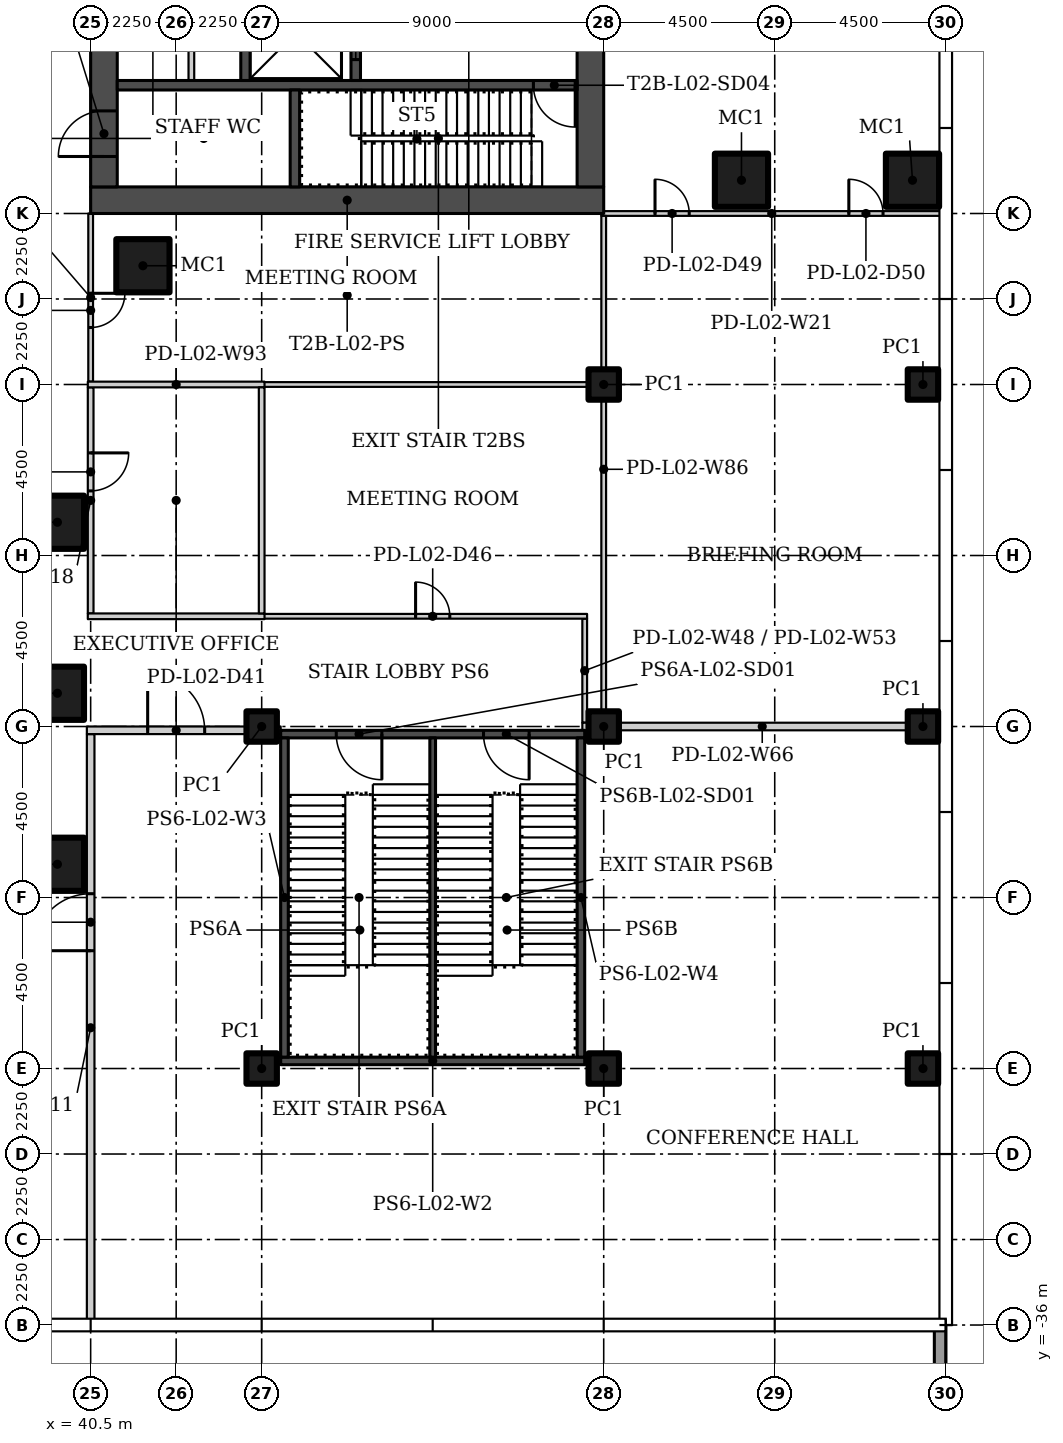
"""IFC4 building model, lengths in metres.
Left out: names, types, materials, properties, quantities, classifications, styles, units other than length and angle.
Written with IfcOpenShell. Run it as: python <this file> out.ifc"""

import sys

from ifc_helpers import new_model, si_unit, direction, frame, frame_2d, origin, origin_2d, place, context, subcontext, project, spatial, rectangle, hollow_rectangle, extrude, element, fill, save


model = new_model("IFC4")
c1 = context("Model", 3, precision=1e-05, world=origin(), true_north=direction((0.0, 1.0)))
c2 = subcontext(c1, "Body", "Model", "MODEL_VIEW")
j1 = project(units=[si_unit("LENGTHUNIT", "METRE"), si_unit("PLANEANGLEUNIT", "RADIAN")], contexts=[c1])
p1 = place(None, origin())
s1 = spatial("IfcSite", under=j1, at=p1, CompositionType="ELEMENT")
p2 = place(p1, origin())
s2 = spatial("IfcBuilding", under=s1, at=p2, CompositionType="ELEMENT")
p3 = place(p2, frame((0.0, 0.0, 12.5)))
s3 = spatial("IfcBuildingStorey", under=s2, at=p3, CompositionType="ELEMENT", Elevation=12.5)
for number, where in (
    (1, (41.875, -8.125, 0.0)),
    (2, (39.625, -14.875, 0.0)),
    (3, (39.625, -19.375, 0.0)),
    (4, (39.625, -23.875, 0.0)),
    (5, (57.625, -5.875, 0.0)),
    (6, (62.125, -5.875, 0.0)),
):
    element("IfcColumn", number, at=place(p3, frame(where)), inside=s3, PredefinedType="COLUMN", context=c2, shape_type="SweptSolid", body=[
        extrude(hollow_rectangle(XDim=1.4, YDim=1.4, WallThickness=0.06, at=origin_2d()), origin(), (0.0, 0.0, 1.0), 5.6),
    ])
for number, where in (
    (7, (45.0, -29.25, 0.0)),
    (8, (45.0, -20.25, 0.0)),
    (9, (54.0, -29.25, 0.0)),
    (10, (54.0, -20.25, 0.0)),
    (11, (54.0, -11.25, 0.0)),
    (12, (62.4, -29.25, 0.0)),
    (13, (62.4, -20.25, 0.0)),
    (14, (62.4, -11.25, 0.0)),
):
    element("IfcColumn", number, at=place(p3, frame(where)), inside=s3, PredefinedType="COLUMN", context=c2, shape_type="SweptSolid", body=[
        extrude(hollow_rectangle(XDim=0.8, YDim=0.8, WallThickness=0.03, at=origin_2d()), origin(), (0.0, 0.0, 1.0), 5.6),
    ])
p4 = place(p3, frame((40.5, -35.905, 0.0), z_axis=(0.0, 0.0, 1.0), x_axis=(0.0, 1.0, 0.0)))
e15 = element("IfcWall", 15, at=p4, inside=s3, PredefinedType="PARTITIONING", context=c2, shape_type="SweptSolid", body=[
    extrude(rectangle(XDim=15.455, YDim=0.2, at=frame_2d((7.728, 0.0))), origin(), (0.0, 0.0, 1.0), 5.6),
])
p5 = place(p4, frame((9.755, 0.0, 0.0)))
e16 = element("IfcOpeningElement", 16, at=p5, cuts=e15, PredefinedType="OPENING", context=c2, shape_type="SweptSolid", body=[
    extrude(rectangle(XDim=1.5, YDim=2.1, at=frame_2d((0.75, 1.05))), frame((0.0, 0.11, 0.0), z_axis=(0.0, -1.0, 0.0), x_axis=(1.0, 0.0, 0.0)), (0.0, 0.0, 1.0), 0.22),
])
p6 = place(p3, frame((40.5, -6.75, 0.0), z_axis=(0.0, 0.0, 1.0), x_axis=(0.0, -1.0, 0.0)))
e17 = element("IfcWall", 17, at=p6, inside=s3, PredefinedType="PARTITIONING", context=c2, shape_type="SweptSolid", body=[
    extrude(rectangle(XDim=4.425, YDim=0.125, at=frame_2d((2.212, 0.0))), origin(), (0.0, 0.0, 1.0), 5.6),
])
p7 = place(p6, frame((2.1, 0.0, 0.0)))
e18 = element("IfcOpeningElement", 18, at=p7, cuts=e17, PredefinedType="OPENING", context=c2, shape_type="SweptSolid", body=[
    extrude(rectangle(XDim=0.9, YDim=2.1, at=frame_2d((0.45, 1.05))), frame((0.0, 0.073, 0.0), z_axis=(0.0, -1.0, 0.0), x_axis=(1.0, 0.0, 0.0)), (0.0, 0.0, 1.0), 0.145),
])
p8 = place(p3, frame((40.5, -11.325, 0.0), z_axis=(0.0, 0.0, 1.0), x_axis=(0.0, -1.0, 0.0)))
e19 = element("IfcWall", 19, at=p8, inside=s3, PredefinedType="PARTITIONING", context=c2, shape_type="SweptSolid", body=[
    extrude(rectangle(XDim=5.95, YDim=0.15, at=frame_2d((2.975, 0.0))), origin(), (0.0, 0.0, 1.0), 5.6),
])
p9 = place(p8, frame((1.725, 0.0, 0.0)))
e20 = element("IfcOpeningElement", 20, at=p9, cuts=e19, PredefinedType="OPENING", context=c2, shape_type="SweptSolid", body=[
    extrude(rectangle(XDim=1.0, YDim=2.4, at=frame_2d((0.5, 1.2))), frame((0.0, 0.085, 0.0), z_axis=(0.0, -1.0, 0.0), x_axis=(1.0, 0.0, 0.0)), (0.0, 0.0, 1.0), 0.17),
])
p10 = place(p3, frame((53.938, -6.75, 0.0)))
e21 = element("IfcWall", 21, at=p10, inside=s3, PredefinedType="PARTITIONING", context=c2, shape_type="SweptSolid", body=[
    extrude(rectangle(XDim=8.968, YDim=0.125, at=frame_2d((4.484, 0.0))), origin(), (0.0, 0.0, 1.0), 5.6),
])
p11 = place(p10, frame((1.413, 0.0, 0.0)))
e22 = element("IfcOpeningElement", 22, at=p11, cuts=e21, PredefinedType="OPENING", context=c2, shape_type="SweptSolid", body=[
    extrude(rectangle(XDim=0.9, YDim=2.1, at=frame_2d((0.45, 1.05))), frame((0.0, 0.073, 0.0), z_axis=(0.0, -1.0, 0.0), x_axis=(1.0, 0.0, 0.0)), (0.0, 0.0, 1.0), 0.145),
])
p12 = place(p10, frame((6.512, 0.0, 0.0)))
e23 = element("IfcOpeningElement", 23, at=p12, cuts=e21, PredefinedType="OPENING", context=c2, shape_type="SweptSolid", body=[
    extrude(rectangle(XDim=0.9, YDim=2.1, at=frame_2d((0.45, 1.05))), frame((0.0, 0.073, 0.0), z_axis=(0.0, -1.0, 0.0), x_axis=(1.0, 0.0, 0.0)), (0.0, 0.0, 1.0), 0.145),
])
p13 = place(p3, frame((53.5, -17.412, 0.0), z_axis=(0.0, 0.0, 1.0), x_axis=(0.0, -1.0, 0.0)))
e24 = element("IfcWall", 24, at=p13, inside=s3, PredefinedType="PARTITIONING", context=c2, shape_type="SweptSolid", body=[
    extrude(rectangle(XDim=2.738, YDim=0.125, at=frame_2d((1.369, 0.0))), origin(), (0.0, 0.0, 1.0), 5.6),
])
p14 = place(p3, frame((44.925, -17.35, 0.0)))
e25 = element("IfcWall", 25, at=p14, inside=s3, PredefinedType="PARTITIONING", context=c2, shape_type="SweptSolid", body=[
    extrude(rectangle(XDim=8.637, YDim=0.125, at=frame_2d((4.319, 0.0))), origin(), (0.0, 0.0, 1.0), 5.6),
])
p15 = place(p14, frame((4.125, 0.0, 0.0)))
e26 = element("IfcOpeningElement", 26, at=p15, cuts=e25, PredefinedType="OPENING", context=c2, shape_type="SweptSolid", body=[
    extrude(rectangle(XDim=0.9, YDim=2.1, at=frame_2d((0.45, 1.05))), frame((0.0, 0.073, 0.0), z_axis=(0.0, -1.0, 0.0), x_axis=(1.0, 0.0, 0.0)), (0.0, 0.0, 1.0), 0.145),
])
p16 = place(p3, frame((40.4, -20.35, 0.0)))
e27 = element("IfcWall", 27, at=p16, inside=s3, PredefinedType="PARTITIONING", context=c2, shape_type="SweptSolid", body=[
    extrude(rectangle(XDim=5.1, YDim=0.2, at=frame_2d((2.55, 0.0))), origin(), (0.0, 0.0, 1.0), 5.6),
])
p17 = place(p16, frame((1.6, 0.0, 0.0)))
e28 = element("IfcOpeningElement", 28, at=p17, cuts=e27, PredefinedType="OPENING", context=c2, shape_type="SweptSolid", body=[
    extrude(rectangle(XDim=1.5, YDim=2.1, at=frame_2d((0.75, 1.05))), frame((0.0, 0.11, 0.0), z_axis=(0.0, -1.0, 0.0), x_axis=(1.0, 0.0, 0.0)), (0.0, 0.0, 1.0), 0.22),
])
p18 = place(p3, frame((40.425, -17.35, 0.0)))
e29 = element("IfcWall", 29, at=p18, inside=s3, PredefinedType="PARTITIONING", context=c2, shape_type="SweptSolid", body=[
    extrude(rectangle(XDim=4.65, YDim=0.15, at=frame_2d((2.325, 0.0))), origin(), (0.0, 0.0, 1.0), 5.6),
])
p19 = place(p3, frame((62.905, -20.25, 0.0), z_axis=(0.0, 0.0, 1.0), x_axis=(-1.0, 0.0, 0.0)))
e30 = element("IfcWall", 30, at=p19, inside=s3, PredefinedType="PARTITIONING", context=c2, shape_type="SweptSolid", body=[
    extrude(rectangle(XDim=9.468, YDim=0.2, at=frame_2d((4.734, 0.0))), origin(), (0.0, 0.0, 1.0), 5.6),
])
p20 = place(p3, frame((54.0, -6.812, 0.0), z_axis=(0.0, 0.0, 1.0), x_axis=(0.0, -1.0, 0.0)))
e31 = element("IfcWall", 31, at=p20, inside=s3, PredefinedType="PARTITIONING", context=c2, shape_type="SweptSolid", body=[
    extrude(rectangle(XDim=13.337, YDim=0.125, at=frame_2d((6.669, 0.0))), origin(), (0.0, 0.0, 1.0), 5.6),
])
p21 = place(p3, frame((44.925, -11.25, 0.0)))
e32 = element("IfcWall", 32, at=p21, inside=s3, PredefinedType="PARTITIONING", context=c2, shape_type="SweptSolid", body=[
    extrude(rectangle(XDim=9.012, YDim=0.125, at=frame_2d((4.506, 0.0))), origin(), (0.0, 0.0, 1.0), 5.6),
])
p22 = place(p3, frame((40.425, -11.25, 0.0)))
e33 = element("IfcWall", 33, at=p22, inside=s3, PredefinedType="PARTITIONING", context=c2, shape_type="SweptSolid", body=[
    extrude(rectangle(XDim=4.65, YDim=0.15, at=frame_2d((2.325, 0.0))), origin(), (0.0, 0.0, 1.0), 5.6),
])
p23 = place(p3, frame((45.0, -11.325, 0.0), z_axis=(0.0, 0.0, 1.0), x_axis=(0.0, -1.0, 0.0)))
e34 = element("IfcWall", 34, at=p23, inside=s3, PredefinedType="PARTITIONING", context=c2, shape_type="SweptSolid", body=[
    extrude(rectangle(XDim=5.95, YDim=0.15, at=frame_2d((2.975, 0.0))), origin(), (0.0, 0.0, 1.0), 5.6),
])
p24 = place(p3, frame((62.85, -37.95, 0.0), z_axis=(0.0, 0.0, 1.0), x_axis=(0.0, 1.0, 0.0)))
e35 = element("IfcWall", 35, at=p24, inside=s3, PredefinedType="PARAPET", context=c2, shape_type="SweptSolid", body=[
    extrude(rectangle(XDim=1.95, YDim=0.3, at=frame_2d((0.975, 0.0))), origin(), (0.0, 0.0, 1.0), 1.1),
])
p25 = place(p3, frame((54.0, -6.4, 0.0), z_axis=(0.0, 0.0, 1.0), x_axis=(-1.0, 0.0, 0.0)))
e36 = element("IfcWall", 36, at=p25, inside=s3, PredefinedType="SHEAR", context=c2, shape_type="SweptSolid", body=[
    extrude(rectangle(XDim=13.5, YDim=0.7, at=frame_2d((6.75, 0.0))), origin(), (0.0, 0.0, 1.0), 5.6),
])
p26 = place(p3, frame((53.65, -6.05, 0.0), z_axis=(0.0, 0.0, 1.0), x_axis=(0.0, 1.0, 0.0)))
e37 = element("IfcWall", 37, at=p26, inside=s3, PredefinedType="SHEAR", context=c2, shape_type="SweptSolid", body=[
    extrude(rectangle(XDim=12.1, YDim=0.7, at=frame_2d((6.05, 0.0))), origin(), (0.0, 0.0, 1.0), 5.6),
])
p27 = place(p26, frame((6.4, 0.0, 0.0)))
e38 = element("IfcOpeningElement", 38, at=p27, cuts=e37, PredefinedType="OPENING", context=c2, shape_type="SweptSolid", body=[
    extrude(rectangle(XDim=1.8, YDim=2.4, at=frame_2d((0.9, 1.2))), frame((0.0, 0.36, 0.0), z_axis=(0.0, -1.0, 0.0), x_axis=(1.0, 0.0, 0.0)), (0.0, 0.0, 1.0), 0.72),
])
p28 = place(p3, frame((40.85, -6.05, 0.0), z_axis=(0.0, 0.0, 1.0), x_axis=(0.0, 1.0, 0.0)))
e39 = element("IfcWall", 39, at=p28, inside=s3, PredefinedType="SHEAR", context=c2, shape_type="SweptSolid", body=[
    extrude(rectangle(XDim=12.1, YDim=0.7, at=frame_2d((6.05, 0.0))), origin(), (0.0, 0.0, 1.0), 5.6),
])
p29 = place(p28, frame((0.8, 0.0, 0.0)))
e40 = element("IfcOpeningElement", 40, at=p29, cuts=e39, PredefinedType="OPENING", context=c2, shape_type="SweptSolid", body=[
    extrude(rectangle(XDim=1.2, YDim=2.1, at=frame_2d((0.6, 1.05))), frame((0.0, 0.36, 0.0), z_axis=(0.0, -1.0, 0.0), x_axis=(1.0, 0.0, 0.0)), (0.0, 0.0, 1.0), 0.72),
])
p30 = place(p28, frame((6.4, 0.0, 0.0)))
e41 = element("IfcOpeningElement", 41, at=p30, cuts=e39, PredefinedType="OPENING", context=c2, shape_type="SweptSolid", body=[
    extrude(rectangle(XDim=1.8, YDim=2.4, at=frame_2d((0.9, 1.2))), frame((0.0, 0.36, 0.0), z_axis=(0.0, -1.0, 0.0), x_axis=(1.0, 0.0, 0.0)), (0.0, 0.0, 1.0), 0.72),
])
p31 = place(p3, frame((53.3, -3.375, 0.0), z_axis=(0.0, 0.0, 1.0), x_axis=(-1.0, 0.0, 0.0)))
e42 = element("IfcWall", 42, at=p31, inside=s3, PredefinedType="SHEAR", context=c2, shape_type="SweptSolid", body=[
    extrude(rectangle(XDim=12.1, YDim=0.25, at=frame_2d((6.05, 0.0))), origin(), (0.0, 0.0, 1.0), 5.6),
])
p32 = place(p31, frame((0.05, 0.0, 0.0)))
e43 = element("IfcOpeningElement", 43, at=p32, cuts=e42, PredefinedType="OPENING", context=c2, shape_type="SweptSolid", body=[
    extrude(rectangle(XDim=1.1, YDim=2.1, at=frame_2d((0.55, 1.05))), frame((0.0, 0.135, 0.0), z_axis=(0.0, -1.0, 0.0), x_axis=(1.0, 0.0, 0.0)), (0.0, 0.0, 1.0), 0.27),
])
p33 = place(p3, frame((45.875, -6.05, 0.0), z_axis=(0.0, 0.0, 1.0), x_axis=(0.0, 1.0, 0.0)))
e44 = element("IfcWall", 44, at=p33, inside=s3, PredefinedType="SHEAR", context=c2, shape_type="SweptSolid", body=[
    extrude(rectangle(XDim=2.55, YDim=0.25, at=frame_2d((1.275, 0.0))), origin(), (0.0, 0.0, 1.0), 5.6),
])
p34 = place(p3, frame((47.475, -3.25, 0.0), z_axis=(0.0, 0.0, 1.0), x_axis=(0.0, 1.0, 0.0)))
e45 = element("IfcWall", 45, at=p34, inside=s3, PredefinedType="SHEAR", context=c2, shape_type="SweptSolid", body=[
    extrude(rectangle(XDim=2.5, YDim=0.25, at=frame_2d((1.25, 0.0))), origin(), (0.0, 0.0, 1.0), 5.6),
])
p35 = place(p34, frame((0.55, 0.0, 0.0)))
e46 = element("IfcOpeningElement", 46, at=p35, cuts=e45, PredefinedType="OPENING", context=c2, shape_type="SweptSolid", body=[
    extrude(rectangle(XDim=1.4, YDim=2.4, at=frame_2d((0.7, 1.2))), frame((0.0, 0.135, 0.0), z_axis=(0.0, -1.0, 0.0), x_axis=(1.0, 0.0, 0.0)), (0.0, 0.0, 1.0), 0.27),
])
p36 = place(p3, frame((44.575, -3.25, 0.0), z_axis=(0.0, 0.0, 1.0), x_axis=(0.0, 1.0, 0.0)))
e47 = element("IfcWall", 47, at=p36, inside=s3, PredefinedType="SHEAR", context=c2, shape_type="SweptSolid", body=[
    extrude(rectangle(XDim=2.5, YDim=0.25, at=frame_2d((1.25, 0.0))), origin(), (0.0, 0.0, 1.0), 5.6),
])
p37 = place(p3, frame((43.15, -3.25, 0.0), z_axis=(0.0, 0.0, 1.0), x_axis=(0.0, 1.0, 0.0)))
e48 = element("IfcWall", 48, at=p37, inside=s3, PredefinedType="PARTITIONING", context=c2, shape_type="SweptSolid", body=[
    extrude(rectangle(XDim=2.5, YDim=0.15, at=frame_2d((1.25, 0.0))), origin(), (0.0, 0.0, 1.0), 5.6),
])
p38 = place(p3, frame((53.5, -20.45, 0.0), z_axis=(0.0, 0.0, 1.0), x_axis=(-1.0, 0.0, 0.0)))
e49 = element("IfcWall", 49, at=p38, inside=s3, PredefinedType="SHEAR", context=c2, shape_type="SweptSolid", body=[
    extrude(rectangle(XDim=8.0, YDim=0.2, at=frame_2d((4.0, 0.0))), origin(), (0.0, 0.0, 1.0), 5.6),
])
p39 = place(p38, frame((5.337, 0.0, 0.0)))
e50 = element("IfcOpeningElement", 50, at=p39, cuts=e49, PredefinedType="OPENING", context=c2, shape_type="SweptSolid", body=[
    extrude(rectangle(XDim=1.2, YDim=2.4, at=frame_2d((0.6, 1.2))), frame((0.0, 0.11, 0.0), z_axis=(0.0, -1.0, 0.0), x_axis=(1.0, 0.0, 0.0)), (0.0, 0.0, 1.0), 0.22),
])
p40 = place(p38, frame((1.462, 0.0, 0.0)))
e51 = element("IfcOpeningElement", 51, at=p40, cuts=e49, PredefinedType="OPENING", context=c2, shape_type="SweptSolid", body=[
    extrude(rectangle(XDim=1.2, YDim=2.4, at=frame_2d((0.6, 1.2))), frame((0.0, 0.11, 0.0), z_axis=(0.0, -1.0, 0.0), x_axis=(1.0, 0.0, 0.0)), (0.0, 0.0, 1.0), 0.22),
])
p41 = place(p3, frame((45.5, -29.05, 0.0)))
e52 = element("IfcWall", 52, at=p41, inside=s3, PredefinedType="SHEAR", context=c2, shape_type="SweptSolid", body=[
    extrude(rectangle(XDim=8.0, YDim=0.2, at=frame_2d((4.0, 0.0))), origin(), (0.0, 0.0, 1.0), 5.6),
])
for number, where, z_axis, x_axis in (
    (53, (45.6, -28.95, 0.0), (0.0, 0.0, 1.0), (0.0, 1.0, 0.0)),
    (54, (53.4, -28.95, 0.0), (0.0, 0.0, 1.0), (0.0, 1.0, 0.0)),
):
    element("IfcWall", number, at=place(p3, frame(where, z_axis=z_axis, x_axis=x_axis)), inside=s3, PredefinedType="SHEAR", context=c2, shape_type="SweptSolid", body=[
        extrude(rectangle(XDim=8.4, YDim=0.2, at=frame_2d((4.2, 0.0))), origin(), (0.0, 0.0, 1.0), 5.6),
    ])
p42 = place(p3, frame((49.5, -28.95, 0.0), z_axis=(0.0, 0.0, 1.0), x_axis=(0.0, 1.0, 0.0)))
e55 = element("IfcWall", 55, at=p42, inside=s3, PredefinedType="SHEAR", context=c2, shape_type="SweptSolid", body=[
    extrude(rectangle(XDim=8.4, YDim=0.15, at=frame_2d((4.2, 0.0))), origin(), (0.0, 0.0, 1.0), 5.6),
])
p43 = place(p5, origin())
e56 = element("IfcDoor", 56, at=p43, inside=s3, OperationType="DOUBLE_DOOR_SINGLE_SWING", PredefinedType="DOOR", context=c2, shape_type="SweptSolid", body=[
    extrude(rectangle(XDim=1.5, YDim=2.1, at=frame_2d((0.75, 1.05))), frame((0.0, 0.025, 0.0), z_axis=(0.0, -1.0, 0.0), x_axis=(1.0, 0.0, 0.0)), (0.0, 0.0, 1.0), 0.05),
])
fill(e16, e56)
p44 = place(p17, origin())
e57 = element("IfcDoor", 57, at=p44, inside=s3, OperationType="DOUBLE_DOOR_SINGLE_SWING", PredefinedType="DOOR", context=c2, shape_type="SweptSolid", body=[
    extrude(rectangle(XDim=1.5, YDim=2.1, at=frame_2d((0.75, 1.05))), frame((0.0, 0.025, 0.0), z_axis=(0.0, -1.0, 0.0), x_axis=(1.0, 0.0, 0.0)), (0.0, 0.0, 1.0), 0.05),
])
fill(e28, e57)
p45 = place(p9, origin())
e58 = element("IfcDoor", 58, at=p45, inside=s3, OperationType="SINGLE_SWING_LEFT", PredefinedType="DOOR", context=c2, shape_type="SweptSolid", body=[
    extrude(rectangle(XDim=1.0, YDim=2.4, at=frame_2d((0.5, 1.2))), frame((0.0, 0.025, 0.0), z_axis=(0.0, -1.0, 0.0), x_axis=(1.0, 0.0, 0.0)), (0.0, 0.0, 1.0), 0.05),
])
fill(e20, e58)
p46 = place(p7, origin())
e59 = element("IfcDoor", 59, at=p46, inside=s3, OperationType="SINGLE_SWING_RIGHT", PredefinedType="DOOR", context=c2, shape_type="SweptSolid", body=[
    extrude(rectangle(XDim=0.9, YDim=2.1, at=frame_2d((0.45, 1.05))), frame((0.0, 0.025, 0.0), z_axis=(0.0, -1.0, 0.0), x_axis=(1.0, 0.0, 0.0)), (0.0, 0.0, 1.0), 0.05),
])
fill(e18, e59)
p47 = place(p15, origin())
e60 = element("IfcDoor", 60, at=p47, inside=s3, OperationType="SINGLE_SWING_RIGHT", PredefinedType="DOOR", context=c2, shape_type="SweptSolid", body=[
    extrude(rectangle(XDim=0.9, YDim=2.1, at=frame_2d((0.45, 1.05))), frame((0.0, 0.025, 0.0), z_axis=(0.0, -1.0, 0.0), x_axis=(1.0, 0.0, 0.0)), (0.0, 0.0, 1.0), 0.05),
])
fill(e26, e60)
p48 = place(p11, origin())
e61 = element("IfcDoor", 61, at=p48, inside=s3, OperationType="SINGLE_SWING_LEFT", PredefinedType="DOOR", context=c2, shape_type="SweptSolid", body=[
    extrude(rectangle(XDim=0.9, YDim=2.1, at=frame_2d((0.45, 1.05))), frame((0.0, 0.025, 0.0), z_axis=(0.0, -1.0, 0.0), x_axis=(1.0, 0.0, 0.0)), (0.0, 0.0, 1.0), 0.05),
])
fill(e22, e61)
p49 = place(p12, origin())
e62 = element("IfcDoor", 62, at=p49, inside=s3, OperationType="SINGLE_SWING_RIGHT", PredefinedType="DOOR", context=c2, shape_type="SweptSolid", body=[
    extrude(rectangle(XDim=0.9, YDim=2.1, at=frame_2d((0.45, 1.05))), frame((0.0, 0.025, 0.0), z_axis=(0.0, -1.0, 0.0), x_axis=(1.0, 0.0, 0.0)), (0.0, 0.0, 1.0), 0.05),
])
fill(e23, e62)
p50 = place(p29, origin())
e63 = element("IfcDoor", 63, at=p50, inside=s3, OperationType="SINGLE_SWING_LEFT", PredefinedType="DOOR", context=c2, shape_type="SweptSolid", body=[
    extrude(rectangle(XDim=1.2, YDim=2.1, at=frame_2d((0.6, 1.05))), frame((0.0, 0.025, 0.0), z_axis=(0.0, -1.0, 0.0), x_axis=(1.0, 0.0, 0.0)), (0.0, 0.0, 1.0), 0.05),
])
fill(e40, e63)
p51 = place(p32, origin())
e64 = element("IfcDoor", 64, at=p51, inside=s3, OperationType="SINGLE_SWING_LEFT", PredefinedType="DOOR", context=c2, shape_type="SweptSolid", body=[
    extrude(rectangle(XDim=1.1, YDim=2.1, at=frame_2d((0.55, 1.05))), frame((0.0, 0.025, 0.0), z_axis=(0.0, -1.0, 0.0), x_axis=(1.0, 0.0, 0.0)), (0.0, 0.0, 1.0), 0.05),
])
fill(e43, e64)
p52 = place(p35, origin())
e65 = element("IfcDoor", 65, at=p52, inside=s3, OperationType="SLIDING_TO_LEFT", PredefinedType="DOOR", context=c2, shape_type="SweptSolid", body=[
    extrude(rectangle(XDim=1.4, YDim=2.4, at=frame_2d((0.7, 1.2))), frame((0.0, 0.025, 0.0), z_axis=(0.0, -1.0, 0.0), x_axis=(1.0, 0.0, 0.0)), (0.0, 0.0, 1.0), 0.05),
])
fill(e46, e65)
p53 = place(p39, origin())
e66 = element("IfcDoor", 66, at=p53, inside=s3, OperationType="SINGLE_SWING_LEFT", PredefinedType="DOOR", context=c2, shape_type="SweptSolid", body=[
    extrude(rectangle(XDim=1.2, YDim=2.4, at=frame_2d((0.6, 1.2))), frame((0.0, 0.025, 0.0), z_axis=(0.0, -1.0, 0.0), x_axis=(1.0, 0.0, 0.0)), (0.0, 0.0, 1.0), 0.05),
])
fill(e50, e66)
p54 = place(p40, origin())
e67 = element("IfcDoor", 67, at=p54, inside=s3, OperationType="SINGLE_SWING_RIGHT", PredefinedType="DOOR", context=c2, shape_type="SweptSolid", body=[
    extrude(rectangle(XDim=1.2, YDim=2.4, at=frame_2d((0.6, 1.2))), frame((0.0, 0.025, 0.0), z_axis=(0.0, -1.0, 0.0), x_axis=(1.0, 0.0, 0.0)), (0.0, 0.0, 1.0), 0.05),
])
fill(e51, e67)
save(model, sys.argv[1])
